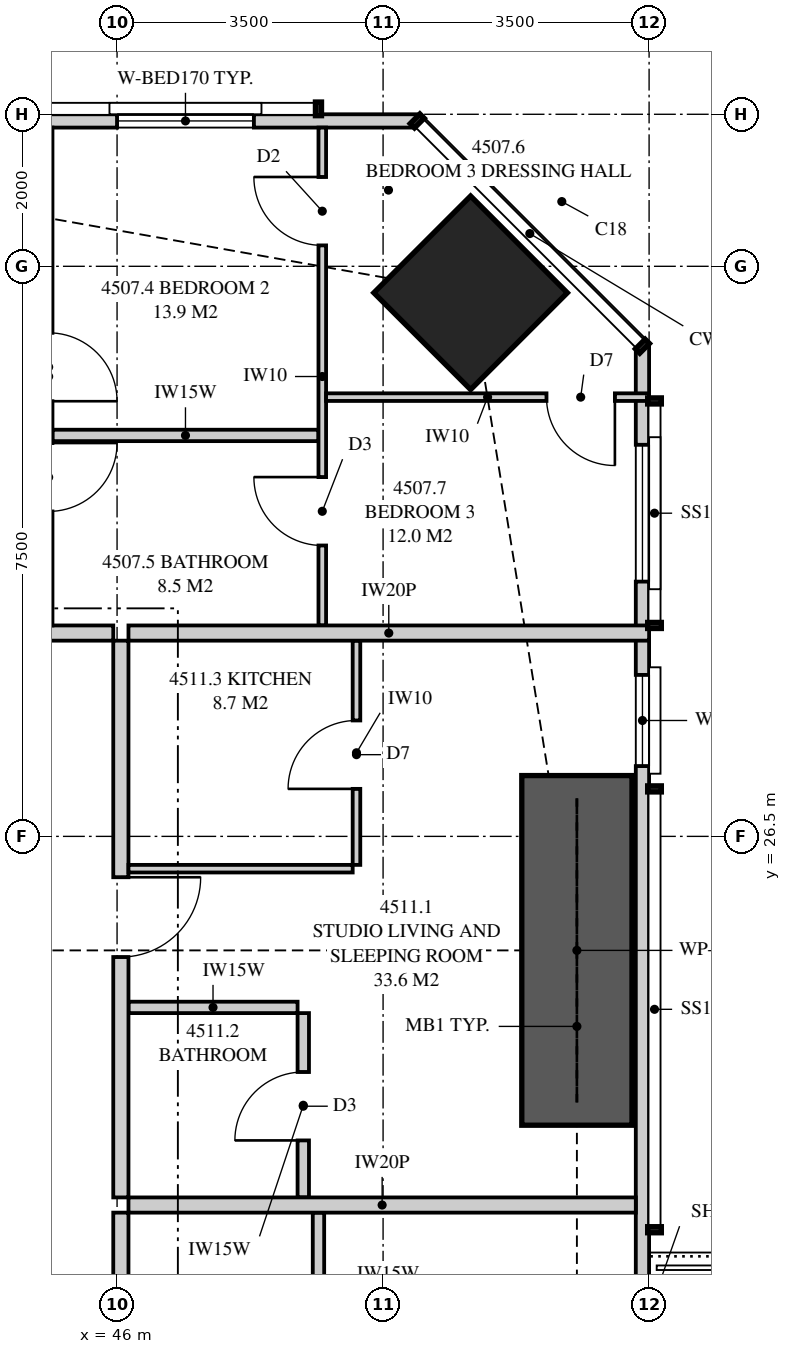
"""IFC4 building model, lengths in metres.
Left out: names, types, materials, properties, quantities, classifications, styles, units other than length and angle.
Written with IfcOpenShell. Run it as: python <this file> out.ifc"""

import sys

from ifc_helpers import new_model, si_unit, direction, frame, frame_2d, origin, origin_2d, place, context, subcontext, project, spatial, polyline, rectangle, outline, extrude, element, fill, save


model = new_model("IFC4")
c1 = context("Model", 3, precision=1e-05, world=origin(), true_north=direction((0.0, 1.0)))
c2 = subcontext(c1, "Body", "Model", "MODEL_VIEW")
j1 = project(units=[si_unit("LENGTHUNIT", "METRE"), si_unit("PLANEANGLEUNIT", "RADIAN")], contexts=[c1])
p1 = place(None, origin())
s1 = spatial("IfcSite", under=j1, at=p1, CompositionType="ELEMENT")
p2 = place(p1, origin())
s2 = spatial("IfcBuilding", under=s1, at=p2, CompositionType="ELEMENT")
p3 = place(p2, frame((0.0, 0.0, 167.75)))
s3 = spatial("IfcBuildingStorey", under=s2, at=p3, CompositionType="ELEMENT", Elevation=167.75)
p4 = place(p3, frame((50.652, 33.652, 0.0), z_axis=(0.0, 0.0, 1.0), x_axis=(0.707106781187, 0.707106781187, 0.0)))
e1 = element("IfcColumn", 1, at=p4, inside=s3, PredefinedType="COLUMN", context=c2, shape_type="SweptSolid", body=[
    extrude(rectangle(XDim=1.8, YDim=1.8, at=origin_2d()), origin(), (0.0, 0.0, 1.0), 3.35),
])
p5 = place(p3, frame((52.913, 3.051, 0.0), z_axis=(0.0, 0.0, 1.0), x_axis=(0.0, 1.0, 0.0)))
e2 = element("IfcWall", 2, at=p5, inside=s3, PredefinedType="SOLIDWALL", context=c2, shape_type="SweptSolid", body=[
    extrude(outline(polyline([(0.0, 0.0), (29.897, 0.0), (29.897, 3.11), (22.167, 3.11), (22.167, 2.15), (22.074, 2.15), (22.074, 3.11), (21.949, 3.11), (21.949, 2.15), (9.949, 2.15), (9.949, 3.11), (9.847, 3.11), (9.847, 2.15), (9.706, 2.15), (9.706, 3.11), (0.0, 3.11), (0.0, 0.0)])), frame((0.0, 0.087, 0.0), z_axis=(0.0, -1.0, 0.0), x_axis=(1.0, 0.0, 0.0)), (0.0, 0.0, 1.0), 0.175),
])
p6 = place(p5, frame((1.797, 0.0, 0.4)))
e3 = element("IfcOpeningElement", 3, at=p6, cuts=e2, PredefinedType="OPENING", context=c2, shape_type="SweptSolid", body=[
    extrude(rectangle(XDim=1.8, YDim=1.7, at=frame_2d((0.9, 0.85))), frame((0.0, 0.097, 0.0), z_axis=(0.0, -1.0, 0.0), x_axis=(1.0, 0.0, 0.0)), (0.0, 0.0, 1.0), 0.195),
])
p7 = place(p5, frame((5.674, 0.0, 0.4)))
e4 = element("IfcOpeningElement", 4, at=p7, cuts=e2, PredefinedType="OPENING", context=c2, shape_type="SweptSolid", body=[
    extrude(rectangle(XDim=1.8, YDim=1.7, at=frame_2d((0.9, 0.85))), frame((0.0, 0.097, 0.0), z_axis=(0.0, -1.0, 0.0), x_axis=(1.0, 0.0, 0.0)), (0.0, 0.0, 1.0), 0.195),
])
p8 = place(p5, frame((12.349, 0.0, 0.4)))
e5 = element("IfcOpeningElement", 5, at=p8, cuts=e2, PredefinedType="OPENING", context=c2, shape_type="SweptSolid", body=[
    extrude(rectangle(XDim=2.4, YDim=1.7, at=frame_2d((1.2, 0.85))), frame((0.0, 0.097, 0.0), z_axis=(0.0, -1.0, 0.0), x_axis=(1.0, 0.0, 0.0)), (0.0, 0.0, 1.0), 0.195),
])
p9 = place(p5, frame((15.274, 0.0, 0.0)))
e6 = element("IfcOpeningElement", 6, at=p9, cuts=e2, PredefinedType="OPENING", context=c2, shape_type="SweptSolid", body=[
    extrude(rectangle(XDim=1.8, YDim=2.1, at=frame_2d((0.9, 1.05))), frame((0.0, 0.097, 0.0), z_axis=(0.0, -1.0, 0.0), x_axis=(1.0, 0.0, 0.0)), (0.0, 0.0, 1.0), 0.195),
])
p10 = place(p5, frame((24.373, 0.0, 0.4)))
e7 = element("IfcOpeningElement", 7, at=p10, cuts=e2, PredefinedType="OPENING", context=c2, shape_type="SweptSolid", body=[
    extrude(rectangle(XDim=1.2, YDim=1.7, at=frame_2d((0.6, 0.85))), frame((0.0, 0.097, 0.0), z_axis=(0.0, -1.0, 0.0), x_axis=(1.0, 0.0, 0.0)), (0.0, 0.0, 1.0), 0.195),
])
p11 = place(p5, frame((26.801, 0.0, 0.4)))
e8 = element("IfcOpeningElement", 8, at=p11, cuts=e2, PredefinedType="OPENING", context=c2, shape_type="SweptSolid", body=[
    extrude(rectangle(XDim=1.8, YDim=1.7, at=frame_2d((0.9, 0.85))), frame((0.0, 0.097, 0.0), z_axis=(0.0, -1.0, 0.0), x_axis=(1.0, 0.0, 0.0)), (0.0, 0.0, 1.0), 0.195),
])
p12 = place(p3, frame((49.949, 35.913, 0.0), z_axis=(0.0, 0.0, 1.0), x_axis=(-1.0, 0.0, 0.0)))
e9 = element("IfcWall", 9, at=p12, inside=s3, PredefinedType="SOLIDWALL", context=c2, shape_type="SweptSolid", body=[
    extrude(outline(polyline([(0.0, 0.0), (34.897, 0.0), (34.897, 3.11), (27.91, 3.11), (27.91, 2.15), (27.836, 2.15), (27.836, 3.11), (27.699, 3.11), (27.699, 2.15), (7.199, 2.15), (7.199, 3.11), (7.062, 3.11), (7.062, 2.15), (6.987, 2.15), (6.987, 3.11), (0.0, 3.11), (0.0, 0.0)])), frame((0.0, 0.087, 0.0), z_axis=(0.0, -1.0, 0.0), x_axis=(1.0, 0.0, 0.0)), (0.0, 0.0, 1.0), 0.175),
])
p13 = place(p12, frame((2.149, 0.0, 0.4)))
e10 = element("IfcOpeningElement", 10, at=p13, cuts=e9, PredefinedType="OPENING", context=c2, shape_type="SweptSolid", body=[
    extrude(rectangle(XDim=1.8, YDim=1.7, at=frame_2d((0.9, 0.85))), frame((0.0, 0.097, 0.0), z_axis=(0.0, -1.0, 0.0), x_axis=(1.0, 0.0, 0.0)), (0.0, 0.0, 1.0), 0.195),
])
p14 = place(p12, frame((10.299, 0.0, 0.0)))
e11 = element("IfcOpeningElement", 11, at=p14, cuts=e9, PredefinedType="OPENING", context=c2, shape_type="SweptSolid", body=[
    extrude(rectangle(XDim=1.8, YDim=2.1, at=frame_2d((0.9, 1.05))), frame((0.0, 0.097, 0.0), z_axis=(0.0, -1.0, 0.0), x_axis=(1.0, 0.0, 0.0)), (0.0, 0.0, 1.0), 0.195),
])
p15 = place(p12, frame((13.231, 0.0, 0.4)))
e12 = element("IfcOpeningElement", 12, at=p15, cuts=e9, PredefinedType="OPENING", context=c2, shape_type="SweptSolid", body=[
    extrude(rectangle(XDim=1.8, YDim=1.7, at=frame_2d((0.9, 0.85))), frame((0.0, 0.097, 0.0), z_axis=(0.0, -1.0, 0.0), x_axis=(1.0, 0.0, 0.0)), (0.0, 0.0, 1.0), 0.195),
])
p16 = place(p12, frame((22.699, 0.0, 0.0)))
e13 = element("IfcOpeningElement", 13, at=p16, cuts=e9, PredefinedType="OPENING", context=c2, shape_type="SweptSolid", body=[
    extrude(rectangle(XDim=1.8, YDim=2.1, at=frame_2d((0.9, 1.05))), frame((0.0, 0.097, 0.0), z_axis=(0.0, -1.0, 0.0), x_axis=(1.0, 0.0, 0.0)), (0.0, 0.0, 1.0), 0.195),
])
p17 = place(p12, frame((19.853, 0.0, 0.4)))
e14 = element("IfcOpeningElement", 14, at=p17, cuts=e9, PredefinedType="OPENING", context=c2, shape_type="SweptSolid", body=[
    extrude(rectangle(XDim=2.4, YDim=1.7, at=frame_2d((1.2, 0.85))), frame((0.0, 0.097, 0.0), z_axis=(0.0, -1.0, 0.0), x_axis=(1.0, 0.0, 0.0)), (0.0, 0.0, 1.0), 0.195),
])
p18 = place(p12, frame((30.104, 0.0, 0.4)))
e15 = element("IfcOpeningElement", 15, at=p18, cuts=e9, PredefinedType="OPENING", context=c2, shape_type="SweptSolid", body=[
    extrude(rectangle(XDim=2.4, YDim=1.7, at=frame_2d((1.2, 0.85))), frame((0.0, 0.097, 0.0), z_axis=(0.0, -1.0, 0.0), x_axis=(1.0, 0.0, 0.0)), (0.0, 0.0, 1.0), 0.195),
])
p19 = place(p3, frame((45.1, 35.825, 0.0), z_axis=(0.0, 0.0, 1.0), x_axis=(0.0, -1.0, 0.0)))
e16 = element("IfcWall", 16, at=p19, inside=s3, PredefinedType="PARTITIONING", context=c2, shape_type="SweptSolid", body=[
    extrude(outline(polyline([(0.0, 0.0), (6.55, 0.0), (6.55, 3.11), (2.064, 3.11), (2.064, 2.15), (0.318, 2.15), (0.318, 3.11), (0.0, 3.11), (0.0, 0.0)])), frame((0.0, 0.05, 0.0), z_axis=(0.0, -1.0, 0.0), x_axis=(1.0, 0.0, 0.0)), (0.0, 0.0, 1.0), 0.1),
])
p20 = place(p19, frame((2.7, 0.0, 0.0)))
e17 = element("IfcOpeningElement", 17, at=p20, cuts=e16, PredefinedType="OPENING", context=c2, shape_type="SweptSolid", body=[
    extrude(rectangle(XDim=0.9, YDim=2.1, at=frame_2d((0.45, 1.05))), frame((0.0, 0.06, 0.0), z_axis=(0.0, -1.0, 0.0), x_axis=(1.0, 0.0, 0.0)), (0.0, 0.0, 1.0), 0.12),
])
p21 = place(p19, frame((4.15, 0.0, 0.0)))
e18 = element("IfcOpeningElement", 18, at=p21, cuts=e16, PredefinedType="OPENING", context=c2, shape_type="SweptSolid", body=[
    extrude(rectangle(XDim=0.9, YDim=2.1, at=frame_2d((0.45, 1.05))), frame((0.0, 0.06, 0.0), z_axis=(0.0, -1.0, 0.0), x_axis=(1.0, 0.0, 0.0)), (0.0, 0.0, 1.0), 0.12),
])
p22 = place(p3, frame((48.7, 35.825, 0.0), z_axis=(0.0, 0.0, 1.0), x_axis=(0.0, -1.0, 0.0)))
e19 = element("IfcWall", 19, at=p22, inside=s3, PredefinedType="PARTITIONING", context=c2, shape_type="SweptSolid", body=[
    extrude(outline(polyline([(0.0, 0.0), (6.55, 0.0), (6.55, 3.11), (2.701, 3.11), (2.701, 2.15), (0.955, 2.15), (0.955, 3.11), (0.0, 3.11), (0.0, 0.0)])), frame((0.0, 0.05, 0.0), z_axis=(0.0, -1.0, 0.0), x_axis=(1.0, 0.0, 0.0)), (0.0, 0.0, 1.0), 0.1),
])
p23 = place(p22, frame((0.65, 0.0, 0.0)))
e20 = element("IfcOpeningElement", 20, at=p23, cuts=e19, PredefinedType="OPENING", context=c2, shape_type="SweptSolid", body=[
    extrude(rectangle(XDim=0.9, YDim=2.1, at=frame_2d((0.45, 1.05))), frame((0.0, 0.06, 0.0), z_axis=(0.0, -1.0, 0.0), x_axis=(1.0, 0.0, 0.0)), (0.0, 0.0, 1.0), 0.12),
])
p24 = place(p22, frame((4.598, 0.0, 0.0)))
e21 = element("IfcOpeningElement", 21, at=p24, cuts=e19, PredefinedType="OPENING", context=c2, shape_type="SweptSolid", body=[
    extrude(rectangle(XDim=0.9, YDim=2.1, at=frame_2d((0.45, 1.05))), frame((0.0, 0.06, 0.0), z_axis=(0.0, -1.0, 0.0), x_axis=(1.0, 0.0, 0.0)), (0.0, 0.0, 1.0), 0.12),
])
p25 = place(p3, frame((45.15, 31.775, 0.0), z_axis=(0.0, 0.0, 1.0), x_axis=(1.0, 0.0, 0.0)))
e22 = element("IfcWall", 22, at=p25, inside=s3, PredefinedType="PLUMBINGWALL", context=c2, shape_type="SweptSolid", body=[
    extrude(rectangle(XDim=3.5, YDim=0.15, at=frame_2d((1.75, 0.0))), origin(), (0.0, 0.0, 1.0), 3.11),
])
p26 = place(p3, frame((48.75, 32.279, 0.0), z_axis=(0.0, 0.0, 1.0), x_axis=(1.0, 0.0, 0.0)))
e23 = element("IfcWall", 23, at=p26, inside=s3, PredefinedType="PARTITIONING", context=c2, shape_type="SweptSolid", body=[
    extrude(outline(polyline([(0.0, 0.0), (4.25, 0.0), (4.25, 3.11), (2.995, 3.11), (2.995, 2.15), (1.252, 2.15), (1.252, 3.11), (0.0, 3.11), (0.0, 0.0)])), frame((0.0, 0.05, 0.0), z_axis=(0.0, -1.0, 0.0), x_axis=(1.0, 0.0, 0.0)), (0.0, 0.0, 1.0), 0.1),
])
p27 = place(p26, frame((2.9, 0.0, 0.0)))
e24 = element("IfcOpeningElement", 24, at=p27, cuts=e23, PredefinedType="OPENING", context=c2, shape_type="SweptSolid", body=[
    extrude(rectangle(XDim=0.9, YDim=2.1, at=frame_2d((0.45, 1.05))), frame((0.0, 0.06, 0.0), z_axis=(0.0, -1.0, 0.0), x_axis=(1.0, 0.0, 0.0)), (0.0, 0.0, 1.0), 0.12),
])
p28 = place(p3, frame((46.15, 29.175, 0.0), z_axis=(0.0, 0.0, 1.0), x_axis=(1.0, 0.0, 0.0)))
e25 = element("IfcWall", 25, at=p28, inside=s3, PredefinedType="PARTITIONING", context=c2, shape_type="SweptSolid", body=[
    extrude(outline(polyline([(0.0, 0.0), (6.85, 0.0), (6.85, 3.11), (6.147, 3.11), (6.147, 2.15), (4.303, 2.15), (4.303, 3.11), (0.0, 3.11), (0.0, 0.0)])), frame((0.0, 0.1, 0.0), z_axis=(0.0, -1.0, 0.0), x_axis=(1.0, 0.0, 0.0)), (0.0, 0.0, 1.0), 0.2),
])
p29 = place(p3, frame((52.825, 21.65, 0.0), z_axis=(0.0, 0.0, 1.0), x_axis=(-1.0, 0.0, 0.0)))
e26 = element("IfcWall", 26, at=p29, inside=s3, PredefinedType="PARTITIONING", context=c2, shape_type="SweptSolid", body=[
    extrude(outline(polyline([(0.0, 0.0), (6.675, 0.0), (6.675, 3.11), (1.685, 3.11), (1.685, 2.15), (0.0, 2.15), (0.0, 3.11), (0.0, 0.0)])), frame((0.0, 0.1, 0.0), z_axis=(0.0, -1.0, 0.0), x_axis=(1.0, 0.0, 0.0)), (0.0, 0.0, 1.0), 0.2),
])
p30 = place(p3, frame((48.65, 18.1, 0.0), z_axis=(0.0, 0.0, 1.0), x_axis=(0.0, 1.0, 0.0)))
e27 = element("IfcWall", 27, at=p30, inside=s3, PredefinedType="PLUMBINGWALL", context=c2, shape_type="SweptSolid", body=[
    extrude(rectangle(XDim=3.45, YDim=0.15, at=frame_2d((1.725, 0.0))), origin(), (0.0, 0.0, 1.0), 3.11),
])
p31 = place(p3, frame((46.05, 21.75, 0.0), z_axis=(0.0, 0.0, 1.0), x_axis=(0.0, 1.0, 0.0)))
e28 = element("IfcWall", 28, at=p31, inside=s3, PredefinedType="PARTITIONING", context=c2, shape_type="SweptSolid", body=[
    extrude(outline(polyline([(0.0, 0.0), (7.325, 0.0), (7.325, 3.11), (3.587, 3.11), (3.587, 2.541), (2.913, 2.541), (2.913, 3.11), (0.0, 3.11), (0.0, 0.0)])), frame((0.0, 0.1, 0.0), z_axis=(0.0, -1.0, 0.0), x_axis=(1.0, 0.0, 0.0)), (0.0, 0.0, 1.0), 0.2),
])
p32 = place(p31, frame((3.163, 0.0, 0.0)))
e29 = element("IfcOpeningElement", 29, at=p32, cuts=e28, PredefinedType="OPENING", context=c2, shape_type="SweptSolid", body=[
    extrude(rectangle(XDim=1.05, YDim=2.2, at=frame_2d((0.525, 1.1))), frame((0.0, 0.11, 0.0), z_axis=(0.0, -1.0, 0.0), x_axis=(1.0, 0.0, 0.0)), (0.0, 0.0, 1.0), 0.22),
])
p33 = place(p3, frame((48.45, 21.75, 0.0), z_axis=(0.0, 0.0, 1.0), x_axis=(0.0, 1.0, 0.0)))
e30 = element("IfcWall", 30, at=p33, inside=s3, PredefinedType="PLUMBINGWALL", context=c2, shape_type="SweptSolid", body=[
    extrude(rectangle(XDim=2.425, YDim=0.15, at=frame_2d((1.212, 0.0))), origin(), (0.0, 0.0, 1.0), 3.11),
])
p34 = place(p33, frame((0.75, 0.0, 0.0)))
e31 = element("IfcOpeningElement", 31, at=p34, cuts=e30, PredefinedType="OPENING", context=c2, shape_type="SweptSolid", body=[
    extrude(rectangle(XDim=0.9, YDim=2.1, at=frame_2d((0.45, 1.05))), frame((0.0, 0.085, 0.0), z_axis=(0.0, -1.0, 0.0), x_axis=(1.0, 0.0, 0.0)), (0.0, 0.0, 1.0), 0.17),
])
p35 = place(p3, frame((48.375, 24.25, 0.0), z_axis=(0.0, 0.0, 1.0), x_axis=(-1.0, 0.0, 0.0)))
e32 = element("IfcWall", 32, at=p35, inside=s3, PredefinedType="PLUMBINGWALL", context=c2, shape_type="SweptSolid", body=[
    extrude(rectangle(XDim=2.225, YDim=0.15, at=frame_2d((1.113, 0.0))), origin(), (0.0, 0.0, 1.0), 3.11),
])
p36 = place(p3, frame((49.15, 26.125, 0.0), z_axis=(0.0, 0.0, 1.0), x_axis=(0.0, 1.0, 0.0)))
e33 = element("IfcWall", 33, at=p36, inside=s3, PredefinedType="PARTITIONING", context=c2, shape_type="SweptSolid", body=[
    extrude(rectangle(XDim=2.95, YDim=0.1, at=frame_2d((1.475, 0.0))), origin(), (0.0, 0.0, 1.0), 3.11),
])
p37 = place(p36, frame((1.0, 0.0, 0.0)))
e34 = element("IfcOpeningElement", 34, at=p37, cuts=e33, PredefinedType="OPENING", context=c2, shape_type="SweptSolid", body=[
    extrude(rectangle(XDim=0.9, YDim=2.1, at=frame_2d((0.45, 1.05))), frame((0.0, 0.06, 0.0), z_axis=(0.0, -1.0, 0.0), x_axis=(1.0, 0.0, 0.0)), (0.0, 0.0, 1.0), 0.12),
])
p38 = place(p3, frame((49.1, 26.075, 0.0), z_axis=(0.0, 0.0, 1.0), x_axis=(-1.0, 0.0, 0.0)))
e35 = element("IfcWall", 35, at=p38, inside=s3, PredefinedType="PARTITIONING", context=c2, shape_type="SweptSolid", body=[
    extrude(rectangle(XDim=2.95, YDim=0.1, at=frame_2d((1.475, 0.0))), origin(), (0.0, 0.0, 1.0), 3.11),
])
p39 = place(p3, frame((43.75, 29.175, 0.0), z_axis=(0.0, 0.0, 1.0), x_axis=(1.0, 0.0, 0.0)))
e36 = element("IfcWall", 36, at=p39, inside=s3, PredefinedType="PARTITIONING", context=c2, shape_type="SweptSolid", body=[
    extrude(rectangle(XDim=2.2, YDim=0.2, at=frame_2d((1.1, 0.0))), origin(), (0.0, 0.0, 1.0), 3.11),
])
p40 = place(p3, frame((46.05, 16.738, 0.0), z_axis=(0.0, 0.0, 1.0), x_axis=(0.0, 1.0, 0.0)))
e37 = element("IfcWall", 37, at=p40, inside=s3, PredefinedType="PARTITIONING", context=c2, shape_type="SweptSolid", body=[
    extrude(rectangle(XDim=4.812, YDim=0.2, at=frame_2d((2.406, 0.0))), origin(), (0.0, 0.0, 1.0), 3.11),
])
p41 = place(p3, frame((52.05, 22.7, 0.0), z_axis=(0.0, 0.0, 1.0), x_axis=(0.0, 1.0, 0.0)))
e38 = element("IfcWall", 38, at=p41, inside=s3, PredefinedType="SHEAR", context=c2, shape_type="SweptSolid", body=[
    extrude(rectangle(XDim=4.6, YDim=1.45, at=frame_2d((2.3, 0.0))), origin(), (0.0, 0.0, 1.0), 3.35),
])
p42 = place(p10, origin())
e39 = element("IfcWindow", 39, at=p42, inside=s3, PartitioningType="SINGLE_PANEL", PredefinedType="WINDOW", context=c2, shape_type="SweptSolid", body=[
    extrude(rectangle(XDim=1.2, YDim=1.7, at=frame_2d((0.6, 0.85))), frame((0.0, 0.03, 0.0), z_axis=(0.0, -1.0, 0.0), x_axis=(1.0, 0.0, 0.0)), (0.0, 0.0, 1.0), 0.06),
])
fill(e7, e39)
p43 = place(p11, origin())
e40 = element("IfcWindow", 40, at=p43, inside=s3, PartitioningType="SINGLE_PANEL", PredefinedType="WINDOW", context=c2, shape_type="SweptSolid", body=[
    extrude(rectangle(XDim=1.8, YDim=1.7, at=frame_2d((0.9, 0.85))), frame((0.0, 0.03, 0.0), z_axis=(0.0, -1.0, 0.0), x_axis=(1.0, 0.0, 0.0)), (0.0, 0.0, 1.0), 0.06),
])
fill(e8, e40)
p44 = place(p13, origin())
e41 = element("IfcWindow", 41, at=p44, inside=s3, PartitioningType="SINGLE_PANEL", PredefinedType="WINDOW", context=c2, shape_type="SweptSolid", body=[
    extrude(rectangle(XDim=1.8, YDim=1.7, at=frame_2d((0.9, 0.85))), frame((0.0, 0.03, 0.0), z_axis=(0.0, -1.0, 0.0), x_axis=(1.0, 0.0, 0.0)), (0.0, 0.0, 1.0), 0.06),
])
fill(e10, e41)
p45 = place(p27, frame((0.9, 0.0, 0.0), z_axis=(0.0, 0.0, 1.0), x_axis=(-1.0, 0.0, 0.0)))
e42 = element("IfcDoor", 42, at=p45, inside=s3, OperationType="SINGLE_SWING_LEFT", PredefinedType="DOOR", context=c2, shape_type="SweptSolid", body=[
    extrude(rectangle(XDim=0.9, YDim=2.1, at=frame_2d((0.45, 1.05))), frame((0.0, 0.025, 0.0), z_axis=(0.0, -1.0, 0.0), x_axis=(1.0, 0.0, 0.0)), (0.0, 0.0, 1.0), 0.05),
])
fill(e24, e42)
p46 = place(p23, frame((0.9, 0.0, 0.0), z_axis=(0.0, 0.0, 1.0), x_axis=(-1.0, 0.0, 0.0)))
e43 = element("IfcDoor", 43, at=p46, inside=s3, OperationType="SINGLE_SWING_RIGHT", PredefinedType="DOOR", context=c2, shape_type="SweptSolid", body=[
    extrude(rectangle(XDim=0.9, YDim=2.1, at=frame_2d((0.45, 1.05))), frame((0.0, 0.025, 0.0), z_axis=(0.0, -1.0, 0.0), x_axis=(1.0, 0.0, 0.0)), (0.0, 0.0, 1.0), 0.05),
])
fill(e20, e43)
p47 = place(p24, frame((0.9, 0.0, 0.0), z_axis=(0.0, 0.0, 1.0), x_axis=(-1.0, 0.0, 0.0)))
e44 = element("IfcDoor", 44, at=p47, inside=s3, OperationType="SINGLE_SWING_RIGHT", PredefinedType="DOOR", context=c2, shape_type="SweptSolid", body=[
    extrude(rectangle(XDim=0.9, YDim=2.1, at=frame_2d((0.45, 1.05))), frame((0.0, 0.025, 0.0), z_axis=(0.0, -1.0, 0.0), x_axis=(1.0, 0.0, 0.0)), (0.0, 0.0, 1.0), 0.05),
])
fill(e21, e44)
p48 = place(p32, frame((1.05, 0.0, 0.0), z_axis=(0.0, 0.0, 1.0), x_axis=(-1.0, 0.0, 0.0)))
e45 = element("IfcDoor", 45, at=p48, inside=s3, OperationType="SINGLE_SWING_LEFT", PredefinedType="DOOR", context=c2, shape_type="SweptSolid", body=[
    extrude(rectangle(XDim=1.05, YDim=2.2, at=frame_2d((0.525, 1.1))), frame((0.0, 0.025, 0.0), z_axis=(0.0, -1.0, 0.0), x_axis=(1.0, 0.0, 0.0)), (0.0, 0.0, 1.0), 0.05),
])
fill(e29, e45)
p49 = place(p34, origin())
e46 = element("IfcDoor", 46, at=p49, inside=s3, OperationType="SINGLE_SWING_LEFT", PredefinedType="DOOR", context=c2, shape_type="SweptSolid", body=[
    extrude(rectangle(XDim=0.9, YDim=2.1, at=frame_2d((0.45, 1.05))), frame((0.0, 0.025, 0.0), z_axis=(0.0, -1.0, 0.0), x_axis=(1.0, 0.0, 0.0)), (0.0, 0.0, 1.0), 0.05),
])
fill(e31, e46)
p50 = place(p37, origin())
e47 = element("IfcDoor", 47, at=p50, inside=s3, OperationType="SINGLE_SWING_LEFT", PredefinedType="DOOR", context=c2, shape_type="SweptSolid", body=[
    extrude(rectangle(XDim=0.9, YDim=2.1, at=frame_2d((0.45, 1.05))), frame((0.0, 0.025, 0.0), z_axis=(0.0, -1.0, 0.0), x_axis=(1.0, 0.0, 0.0)), (0.0, 0.0, 1.0), 0.05),
])
fill(e34, e47)
save(model, sys.argv[1])
